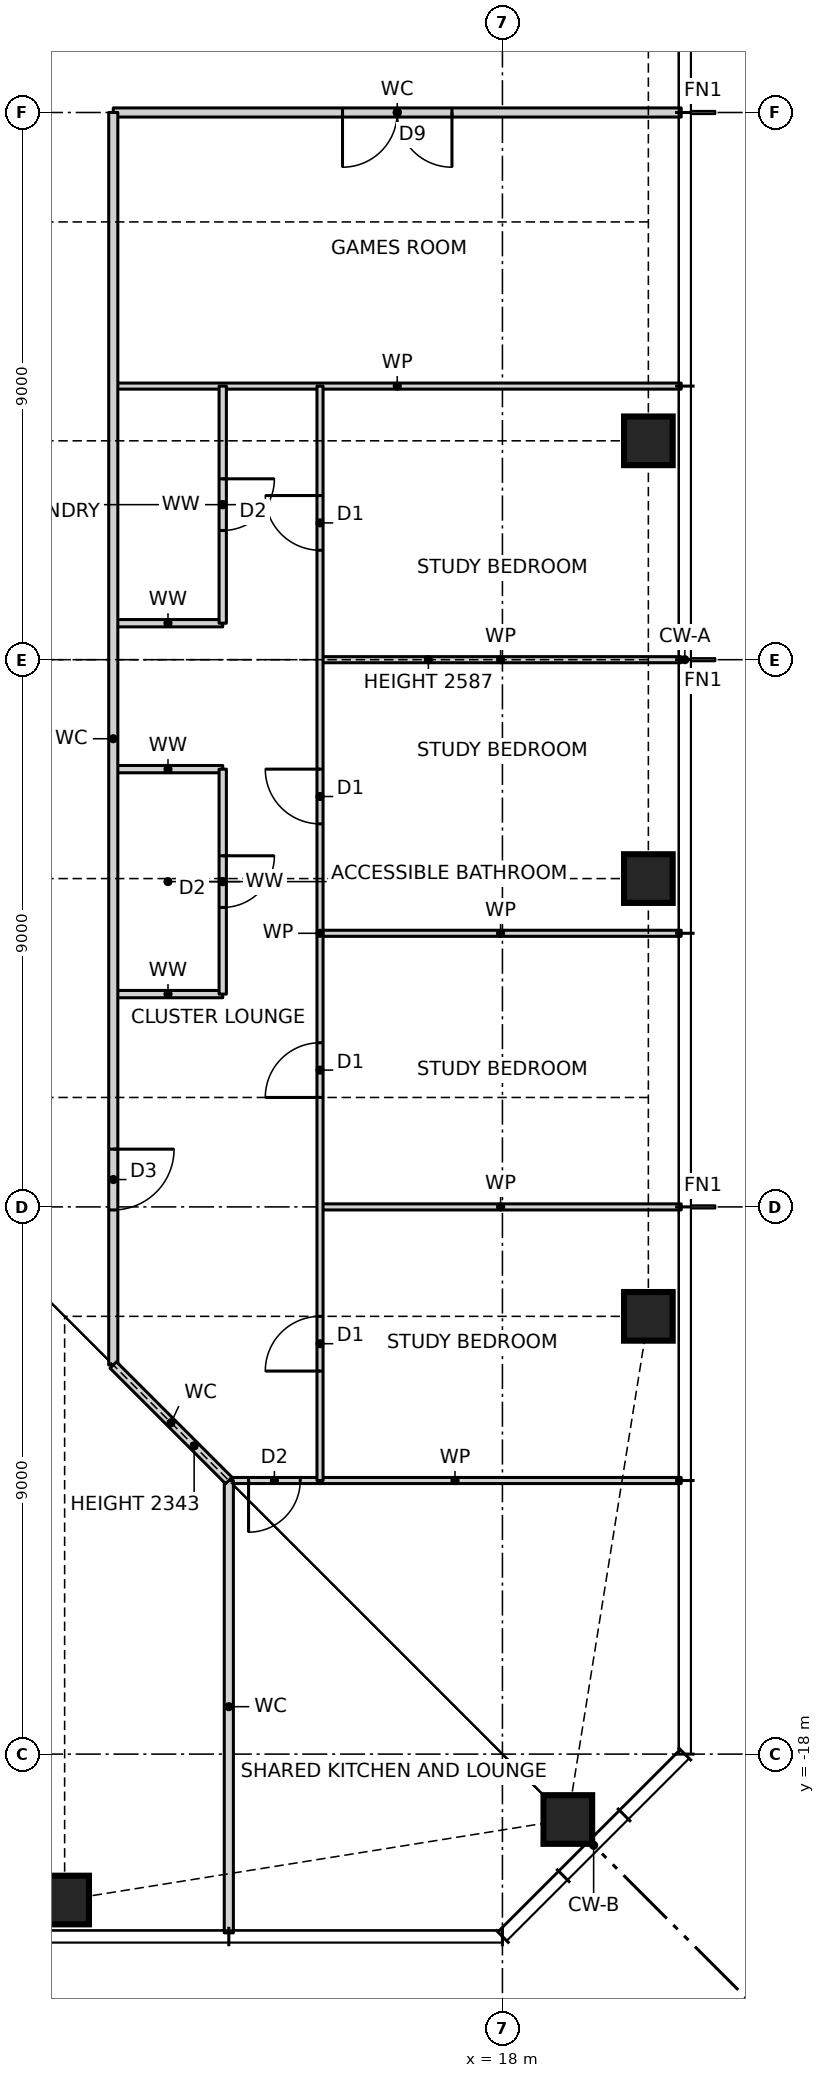
"""IFC4 building model, lengths in metres.
Left out: names, types, materials, properties, quantities, classifications, styles, units other than length and angle.
Written with IfcOpenShell. Run it as: python <this file> out.ifc"""

import sys

from ifc_helpers import new_model, si_unit, direction, frame, frame_2d, origin, origin_2d, place, context, subcontext, project, spatial, rectangle, hollow_rectangle, extrude, element, fill, save


model = new_model("IFC4")
c1 = context("Model", 3, precision=1e-05, world=origin(), true_north=direction((0.0, 1.0)))
c2 = subcontext(c1, "Body", "Model", "MODEL_VIEW")
j1 = project(units=[si_unit("LENGTHUNIT", "METRE"), si_unit("PLANEANGLEUNIT", "RADIAN")], contexts=[c1])
p1 = place(None, origin())
s1 = spatial("IfcSite", under=j1, at=p1, CompositionType="ELEMENT")
p2 = place(p1, origin())
s2 = spatial("IfcBuilding", under=s1, at=p2, CompositionType="ELEMENT")
p3 = place(p2, frame((0.0, 0.0, 108.5)))
s3 = spatial("IfcBuildingStorey", under=s2, at=p3, CompositionType="ELEMENT", Elevation=108.5)
for number, where, z_axis, x_axis in (
    (1, (10.8, -20.4, 0.0), (0.0, 0.0, 1.0), (1.0, 0.0, 0.0)),
    (2, (19.076, -19.076, 0.0), (0.0, 0.0, 1.0), (1.0, 0.0, 0.0)),
    (3, (20.4, -10.8, 0.0), (0.0, 0.0, 1.0), (1.0, 0.0, 0.0)),
    (4, (20.4, -3.6, 0.0), (0.0, 0.0, 1.0), (1.0, 0.0, 0.0)),
    (5, (20.4, 3.6, 0.0), (0.0, 0.0, 1.0), (1.0, 0.0, 0.0)),
):
    element("IfcColumn", number, at=place(p3, frame(where, z_axis=z_axis, x_axis=x_axis)), inside=s3, PredefinedType="COLUMN", context=c2, shape_type="SweptSolid", body=[
        extrude(hollow_rectangle(XDim=0.8, YDim=0.8, WallThickness=0.07, at=origin_2d()), origin(), (0.0, 0.0, 1.0), 3.5),
    ])
p4 = place(p3, frame((13.5, -13.5, 0.0), z_axis=(0.0, 0.0, 1.0), x_axis=(1.0, 0.0, 0.0)))
e6 = element("IfcWall", 6, at=p4, inside=s3, PredefinedType="PARTITIONING", context=c2, shape_type="SweptSolid", body=[
    extrude(rectangle(XDim=7.44, YDim=0.1, at=frame_2d((3.72, 0.0))), origin(), (0.0, 0.0, 1.0), 3.27),
])
p5 = place(p4, frame((0.325, 0.0, 0.0)))
e7 = element("IfcOpeningElement", 7, at=p5, cuts=e6, PredefinedType="OPENING", context=c2, shape_type="SweptSolid", body=[
    extrude(rectangle(XDim=0.85, YDim=2.1, at=frame_2d((0.425, 1.05))), frame((0.0, 0.06, 0.0), z_axis=(0.0, -1.0, 0.0), x_axis=(1.0, 0.0, 0.0)), (0.0, 0.0, 1.0), 0.12),
])
p6 = place(p3, frame((15.0, -9.0, 0.0), z_axis=(0.0, 0.0, 1.0), x_axis=(1.0, 0.0, 0.0)))
e8 = element("IfcWall", 8, at=p6, inside=s3, PredefinedType="PARTITIONING", context=c2, shape_type="SweptSolid", body=[
    extrude(rectangle(XDim=5.94, YDim=0.1, at=frame_2d((2.97, 0.0))), origin(), (0.0, 0.0, 1.0), 3.27),
])
p7 = place(p3, frame((11.6, -5.5, 0.0), z_axis=(0.0, 0.0, 1.0), x_axis=(1.0, 0.0, 0.0)))
e9 = element("IfcWall", 9, at=p7, inside=s3, PredefinedType="PARTITIONING", context=c2, shape_type="SweptSolid", body=[
    extrude(rectangle(XDim=1.8, YDim=0.12, at=frame_2d((0.9, 0.0))), origin(), (0.0, 0.0, 1.0), 3.27),
])
p8 = place(p3, frame((15.0, -4.5, 0.0), z_axis=(0.0, 0.0, 1.0), x_axis=(1.0, 0.0, 0.0)))
e10 = element("IfcWall", 10, at=p8, inside=s3, PredefinedType="PARTITIONING", context=c2, shape_type="SweptSolid", body=[
    extrude(rectangle(XDim=5.94, YDim=0.1, at=frame_2d((2.97, 0.0))), origin(), (0.0, 0.0, 1.0), 3.27),
])
p9 = place(p3, frame((11.6, -1.8, 0.0), z_axis=(0.0, 0.0, 1.0), x_axis=(1.0, 0.0, 0.0)))
e11 = element("IfcWall", 11, at=p9, inside=s3, PredefinedType="PARTITIONING", context=c2, shape_type="SweptSolid", body=[
    extrude(rectangle(XDim=1.8, YDim=0.12, at=frame_2d((0.9, 0.0))), origin(), (0.0, 0.0, 1.0), 3.27),
])
p10 = place(p3, frame((15.0, 0.0, 0.0), z_axis=(0.0, 0.0, 1.0), x_axis=(1.0, 0.0, 0.0)))
e12 = element("IfcWall", 12, at=p10, inside=s3, PredefinedType="PARTITIONING", context=c2, shape_type="SweptSolid", body=[
    extrude(rectangle(XDim=5.94, YDim=0.1, at=frame_2d((2.97, 0.0))), origin(), (0.0, 0.0, 1.0), 2.587),
])
p11 = place(p3, frame((11.6, 0.6, 0.0), z_axis=(0.0, 0.0, 1.0), x_axis=(1.0, 0.0, 0.0)))
e13 = element("IfcWall", 13, at=p11, inside=s3, PredefinedType="PARTITIONING", context=c2, shape_type="SweptSolid", body=[
    extrude(rectangle(XDim=1.8, YDim=0.12, at=frame_2d((0.9, 0.0))), origin(), (0.0, 0.0, 1.0), 3.27),
])
p12 = place(p3, frame((11.6, 4.5, 0.0), z_axis=(0.0, 0.0, 1.0), x_axis=(1.0, 0.0, 0.0)))
e14 = element("IfcWall", 14, at=p12, inside=s3, PredefinedType="PARTITIONING", context=c2, shape_type="SweptSolid", body=[
    extrude(rectangle(XDim=9.34, YDim=0.1, at=frame_2d((4.67, 0.0))), origin(), (0.0, 0.0, 1.0), 3.27),
])
p13 = place(p3, frame((11.6, 9.0, 0.0), z_axis=(0.0, 0.0, 1.0), x_axis=(1.0, 0.0, 0.0)))
e15 = element("IfcWall", 15, at=p13, inside=s3, PredefinedType="PARTITIONING", context=c2, shape_type="SweptSolid", body=[
    extrude(rectangle(XDim=9.34, YDim=0.15, at=frame_2d((4.67, 0.0))), origin(), (0.0, 0.0, 1.0), 3.27),
])
p14 = place(p13, frame((3.77, 0.0, 0.0)))
e16 = element("IfcOpeningElement", 16, at=p14, cuts=e15, PredefinedType="OPENING", context=c2, shape_type="SweptSolid", body=[
    extrude(rectangle(XDim=1.8, YDim=2.1, at=frame_2d((0.9, 1.05))), frame((0.0, 0.085, 0.0), z_axis=(0.0, -1.0, 0.0), x_axis=(1.0, 0.0, 0.0)), (0.0, 0.0, 1.0), 0.17),
])
p15 = place(p3, frame((15.0, -13.5, 0.0), z_axis=(0.0, 0.0, 1.0), x_axis=(0.0, 1.0, 0.0)))
e17 = element("IfcWall", 17, at=p15, inside=s3, PredefinedType="PARTITIONING", context=c2, shape_type="SweptSolid", body=[
    extrude(rectangle(XDim=18.0, YDim=0.1, at=frame_2d((9.0, 0.0))), origin(), (0.0, 0.0, 1.0), 3.27),
])
p16 = place(p15, frame((1.8, 0.0, 0.0)))
e18 = element("IfcOpeningElement", 18, at=p16, cuts=e17, PredefinedType="OPENING", context=c2, shape_type="SweptSolid", body=[
    extrude(rectangle(XDim=0.9, YDim=2.1, at=frame_2d((0.45, 1.05))), frame((0.0, 0.06, 0.0), z_axis=(0.0, -1.0, 0.0), x_axis=(1.0, 0.0, 0.0)), (0.0, 0.0, 1.0), 0.12),
])
p17 = place(p15, frame((6.3, 0.0, 0.0)))
e19 = element("IfcOpeningElement", 19, at=p17, cuts=e17, PredefinedType="OPENING", context=c2, shape_type="SweptSolid", body=[
    extrude(rectangle(XDim=0.9, YDim=2.1, at=frame_2d((0.45, 1.05))), frame((0.0, 0.06, 0.0), z_axis=(0.0, -1.0, 0.0), x_axis=(1.0, 0.0, 0.0)), (0.0, 0.0, 1.0), 0.12),
])
p18 = place(p15, frame((10.8, 0.0, 0.0)))
e20 = element("IfcOpeningElement", 20, at=p18, cuts=e17, PredefinedType="OPENING", context=c2, shape_type="SweptSolid", body=[
    extrude(rectangle(XDim=0.9, YDim=2.1, at=frame_2d((0.45, 1.05))), frame((0.0, 0.06, 0.0), z_axis=(0.0, -1.0, 0.0), x_axis=(1.0, 0.0, 0.0)), (0.0, 0.0, 1.0), 0.12),
])
p19 = place(p15, frame((15.3, 0.0, 0.0)))
e21 = element("IfcOpeningElement", 21, at=p19, cuts=e17, PredefinedType="OPENING", context=c2, shape_type="SweptSolid", body=[
    extrude(rectangle(XDim=0.9, YDim=2.1, at=frame_2d((0.45, 1.05))), frame((0.0, 0.06, 0.0), z_axis=(0.0, -1.0, 0.0), x_axis=(1.0, 0.0, 0.0)), (0.0, 0.0, 1.0), 0.12),
])
p20 = place(p3, frame((13.5, -20.94, 0.0), z_axis=(0.0, 0.0, 1.0), x_axis=(0.0, 1.0, 0.0)))
e22 = element("IfcWall", 22, at=p20, inside=s3, PredefinedType="PARTITIONING", context=c2, shape_type="SweptSolid", body=[
    extrude(rectangle(XDim=7.44, YDim=0.15, at=frame_2d((3.72, 0.0))), origin(), (0.0, 0.0, 1.0), 3.27),
])
p21 = place(p3, frame((13.4, -5.5, 0.0), z_axis=(0.0, 0.0, 1.0), x_axis=(0.0, 1.0, 0.0)))
e23 = element("IfcWall", 23, at=p21, inside=s3, PredefinedType="PARTITIONING", context=c2, shape_type="SweptSolid", body=[
    extrude(rectangle(XDim=3.7, YDim=0.12, at=frame_2d((1.85, 0.0))), origin(), (0.0, 0.0, 1.0), 3.27),
])
p22 = place(p21, frame((1.425, 0.0, 0.0)))
e24 = element("IfcOpeningElement", 24, at=p22, cuts=e23, PredefinedType="OPENING", context=c2, shape_type="SweptSolid", body=[
    extrude(rectangle(XDim=0.85, YDim=2.1, at=frame_2d((0.425, 1.05))), frame((0.0, 0.07, 0.0), z_axis=(0.0, -1.0, 0.0), x_axis=(1.0, 0.0, 0.0)), (0.0, 0.0, 1.0), 0.14),
])
p23 = place(p3, frame((13.4, 0.6, 0.0), z_axis=(0.0, 0.0, 1.0), x_axis=(0.0, 1.0, 0.0)))
e25 = element("IfcWall", 25, at=p23, inside=s3, PredefinedType="PARTITIONING", context=c2, shape_type="SweptSolid", body=[
    extrude(rectangle(XDim=3.9, YDim=0.12, at=frame_2d((1.95, 0.0))), origin(), (0.0, 0.0, 1.0), 3.27),
])
p24 = place(p23, frame((1.525, 0.0, 0.0)))
e26 = element("IfcOpeningElement", 26, at=p24, cuts=e25, PredefinedType="OPENING", context=c2, shape_type="SweptSolid", body=[
    extrude(rectangle(XDim=0.85, YDim=2.1, at=frame_2d((0.425, 1.05))), frame((0.0, 0.07, 0.0), z_axis=(0.0, -1.0, 0.0), x_axis=(1.0, 0.0, 0.0)), (0.0, 0.0, 1.0), 0.14),
])
p25 = place(p3, frame((11.6, -11.6, 0.0), z_axis=(0.0, 0.0, 1.0), x_axis=(0.0, 1.0, 0.0)))
e27 = element("IfcWall", 27, at=p25, inside=s3, PredefinedType="PARTITIONING", context=c2, shape_type="SweptSolid", body=[
    extrude(rectangle(XDim=20.6, YDim=0.15, at=frame_2d((10.3, 0.0))), origin(), (0.0, 0.0, 1.0), 3.27),
])
p26 = place(p25, frame((2.55, 0.0, 0.0)))
e28 = element("IfcOpeningElement", 28, at=p26, cuts=e27, PredefinedType="OPENING", context=c2, shape_type="SweptSolid", body=[
    extrude(rectangle(XDim=1.0, YDim=2.1, at=frame_2d((0.5, 1.05))), frame((0.0, 0.085, 0.0), z_axis=(0.0, -1.0, 0.0), x_axis=(1.0, 0.0, 0.0)), (0.0, 0.0, 1.0), 0.17),
])
p27 = place(p3, frame((13.5, -13.5, 0.0), z_axis=(0.0, 0.0, 1.0), x_axis=(-0.707106781187, 0.707106781187, 0.0)))
e29 = element("IfcWall", 29, at=p27, inside=s3, PredefinedType="PARTITIONING", context=c2, shape_type="SweptSolid", body=[
    extrude(rectangle(XDim=2.687, YDim=0.15, at=frame_2d((1.343, 0.0))), origin(), (0.0, 0.0, 1.0), 2.343),
])
p28 = place(p16, origin())
e30 = element("IfcDoor", 30, at=p28, inside=s3, OperationType="SINGLE_SWING_LEFT", PredefinedType="DOOR", context=c2, shape_type="SweptSolid", body=[
    extrude(rectangle(XDim=0.9, YDim=2.1, at=frame_2d((0.45, 1.05))), frame((0.0, 0.025, 0.0), z_axis=(0.0, -1.0, 0.0), x_axis=(1.0, 0.0, 0.0)), (0.0, 0.0, 1.0), 0.05),
])
fill(e18, e30)
p29 = place(p17, origin())
e31 = element("IfcDoor", 31, at=p29, inside=s3, OperationType="SINGLE_SWING_LEFT", PredefinedType="DOOR", context=c2, shape_type="SweptSolid", body=[
    extrude(rectangle(XDim=0.9, YDim=2.1, at=frame_2d((0.45, 1.05))), frame((0.0, 0.025, 0.0), z_axis=(0.0, -1.0, 0.0), x_axis=(1.0, 0.0, 0.0)), (0.0, 0.0, 1.0), 0.05),
])
fill(e19, e31)
p30 = place(p18, origin())
e32 = element("IfcDoor", 32, at=p30, inside=s3, OperationType="SINGLE_SWING_RIGHT", PredefinedType="DOOR", context=c2, shape_type="SweptSolid", body=[
    extrude(rectangle(XDim=0.9, YDim=2.1, at=frame_2d((0.45, 1.05))), frame((0.0, 0.025, 0.0), z_axis=(0.0, -1.0, 0.0), x_axis=(1.0, 0.0, 0.0)), (0.0, 0.0, 1.0), 0.05),
])
fill(e20, e32)
p31 = place(p19, origin())
e33 = element("IfcDoor", 33, at=p31, inside=s3, OperationType="SINGLE_SWING_RIGHT", PredefinedType="DOOR", context=c2, shape_type="SweptSolid", body=[
    extrude(rectangle(XDim=0.9, YDim=2.1, at=frame_2d((0.45, 1.05))), frame((0.0, 0.025, 0.0), z_axis=(0.0, -1.0, 0.0), x_axis=(1.0, 0.0, 0.0)), (0.0, 0.0, 1.0), 0.05),
])
fill(e21, e33)
p32 = place(p26, frame((1.0, 0.0, 0.0), z_axis=(0.0, 0.0, 1.0), x_axis=(-1.0, 0.0, 0.0)))
e34 = element("IfcDoor", 34, at=p32, inside=s3, OperationType="SINGLE_SWING_LEFT", PredefinedType="DOOR", context=c2, shape_type="SweptSolid", body=[
    extrude(rectangle(XDim=1.0, YDim=2.1, at=frame_2d((0.5, 1.05))), frame((0.0, 0.025, 0.0), z_axis=(0.0, -1.0, 0.0), x_axis=(1.0, 0.0, 0.0)), (0.0, 0.0, 1.0), 0.05),
])
fill(e28, e34)
p33 = place(p22, frame((0.85, 0.0, 0.0), z_axis=(0.0, 0.0, 1.0), x_axis=(-1.0, 0.0, 0.0)))
e35 = element("IfcDoor", 35, at=p33, inside=s3, OperationType="SINGLE_SWING_LEFT", PredefinedType="DOOR", context=c2, shape_type="SweptSolid", body=[
    extrude(rectangle(XDim=0.85, YDim=2.1, at=frame_2d((0.425, 1.05))), frame((0.0, 0.025, 0.0), z_axis=(0.0, -1.0, 0.0), x_axis=(1.0, 0.0, 0.0)), (0.0, 0.0, 1.0), 0.05),
])
fill(e24, e35)
p34 = place(p24, frame((0.85, 0.0, 0.0), z_axis=(0.0, 0.0, 1.0), x_axis=(-1.0, 0.0, 0.0)))
e36 = element("IfcDoor", 36, at=p34, inside=s3, OperationType="SINGLE_SWING_LEFT", PredefinedType="DOOR", context=c2, shape_type="SweptSolid", body=[
    extrude(rectangle(XDim=0.85, YDim=2.1, at=frame_2d((0.425, 1.05))), frame((0.0, 0.025, 0.0), z_axis=(0.0, -1.0, 0.0), x_axis=(1.0, 0.0, 0.0)), (0.0, 0.0, 1.0), 0.05),
])
fill(e26, e36)
p35 = place(p14, frame((1.8, 0.0, 0.0), z_axis=(0.0, 0.0, 1.0), x_axis=(-1.0, 0.0, 0.0)))
e37 = element("IfcDoor", 37, at=p35, inside=s3, OperationType="DOUBLE_DOOR_SINGLE_SWING", PredefinedType="DOOR", context=c2, shape_type="SweptSolid", body=[
    extrude(rectangle(XDim=1.8, YDim=2.1, at=frame_2d((0.9, 1.05))), frame((0.0, 0.025, 0.0), z_axis=(0.0, -1.0, 0.0), x_axis=(1.0, 0.0, 0.0)), (0.0, 0.0, 1.0), 0.05),
])
fill(e16, e37)
p36 = place(p5, frame((0.85, 0.0, 0.0), z_axis=(0.0, 0.0, 1.0), x_axis=(-1.0, 0.0, 0.0)))
e38 = element("IfcDoor", 38, at=p36, inside=s3, OperationType="SINGLE_SWING_RIGHT", PredefinedType="DOOR", context=c2, shape_type="SweptSolid", body=[
    extrude(rectangle(XDim=0.85, YDim=2.1, at=frame_2d((0.425, 1.05))), frame((0.0, 0.025, 0.0), z_axis=(0.0, -1.0, 0.0), x_axis=(1.0, 0.0, 0.0)), (0.0, 0.0, 1.0), 0.05),
])
fill(e7, e38)
save(model, sys.argv[1])
